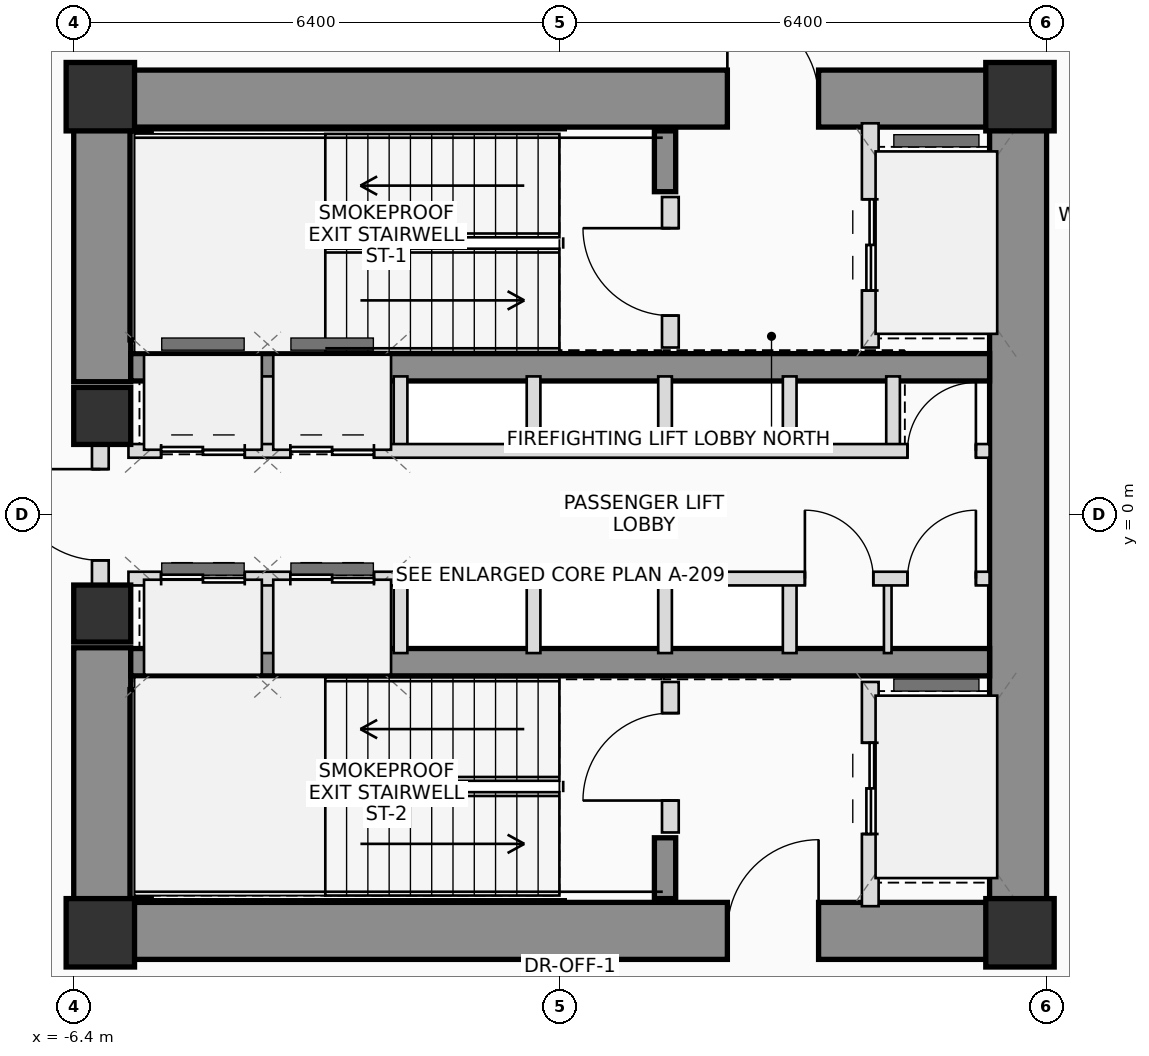
"""IFC4 building model, lengths in metres.
Left out: names, types, materials, properties, quantities, classifications, styles, units other than length and angle.
Written with IfcOpenShell. Run it as: python <this file> out.ifc"""

import sys

from ifc_helpers import new_model, si_unit, direction, frame, frame_2d, origin, origin_2d, place, context, subcontext, project, spatial, rectangle, extrude, source, transform, mapped, element, fill, save


model = new_model("IFC4")
c1 = context("Model", 3, precision=1e-05, world=origin(), true_north=direction((0.0, 1.0)))
c2 = subcontext(c1, "Body", "Model", "MODEL_VIEW")
j1 = project(units=[si_unit("LENGTHUNIT", "METRE"), si_unit("PLANEANGLEUNIT", "RADIAN")], contexts=[c1])
p1 = place(None, origin())
s1 = spatial("IfcSite", under=j1, at=p1, CompositionType="ELEMENT")
p2 = place(p1, origin())
s2 = spatial("IfcBuilding", under=s1, at=p2, CompositionType="ELEMENT")
p3 = place(p2, frame((0.0, 0.0, 89.9)))
s3 = spatial("IfcBuildingStorey", under=s2, at=p3, CompositionType="ELEMENT", Elevation=89.9)
m1 = source(origin(), c2, "Body", "SweptSolid", [
    extrude(rectangle(XDim=0.9, YDim=0.9, at=origin_2d()), origin(), (0.0, 0.0, 1.0), 3.75),
])
for number, where, z_axis, x_axis in (
    (1, (-6.05, -5.5, 0.0), (0.0, 0.0, 1.0), (1.0, 0.0, 0.0)),
    (2, (6.05, -5.5, 0.0), (0.0, 0.0, 1.0), (1.0, 0.0, 0.0)),
    (3, (6.05, 5.5, 0.0), (0.0, 0.0, 1.0), (1.0, 0.0, 0.0)),
    (4, (-6.05, 5.5, 0.0), (0.0, 0.0, 1.0), (1.0, 0.0, 0.0)),
):
    element("IfcColumn", number, at=place(p3, frame(where, z_axis=z_axis, x_axis=x_axis)), inside=s3, PredefinedType="COLUMN", context=c2, shape_type="MappedRepresentation", body=[
        mapped(m1, transform((0.0, 0.0, 0.0), scale=1.0)),
    ])
p4 = place(p3, frame((-6.4, 5.475, 0.0), z_axis=(0.0, 0.0, 1.0), x_axis=(1.0, 0.0, 0.0)))
e5 = element("IfcWall", 5, at=p4, inside=s3, PredefinedType="SHEAR", context=c2, shape_type="SweptSolid", body=[
    extrude(rectangle(XDim=12.8, YDim=0.75, at=frame_2d((6.4, 0.0))), origin(), (0.0, 0.0, 1.0), 3.75),
])
p5 = place(p4, frame((8.6, 0.0, 0.0)))
e6 = element("IfcOpeningElement", 6, at=p5, cuts=e5, PredefinedType="OPENING", context=c2, shape_type="SweptSolid", body=[
    extrude(rectangle(XDim=1.2, YDim=2.2, at=frame_2d((0.6, 1.1))), frame((0.0, 0.385, 0.0), z_axis=(0.0, -1.0, 0.0), x_axis=(1.0, 0.0, 0.0)), (0.0, 0.0, 1.0), 0.77),
])
p6 = place(p3, frame((-6.4, -5.475, 0.0), z_axis=(0.0, 0.0, 1.0), x_axis=(1.0, 0.0, 0.0)))
e7 = element("IfcWall", 7, at=p6, inside=s3, PredefinedType="SHEAR", context=c2, shape_type="SweptSolid", body=[
    extrude(rectangle(XDim=12.8, YDim=0.75, at=frame_2d((6.4, 0.0))), origin(), (0.0, 0.0, 1.0), 3.75),
])
p7 = place(p6, frame((8.6, 0.0, 0.0)))
e8 = element("IfcOpeningElement", 8, at=p7, cuts=e7, PredefinedType="OPENING", context=c2, shape_type="SweptSolid", body=[
    extrude(rectangle(XDim=1.2, YDim=2.2, at=frame_2d((0.6, 1.1))), frame((0.0, 0.385, 0.0), z_axis=(0.0, -1.0, 0.0), x_axis=(1.0, 0.0, 0.0)), (0.0, 0.0, 1.0), 0.77),
])
p8 = place(p3, frame((6.025, -5.1, 0.0), z_axis=(0.0, 0.0, 1.0), x_axis=(0.0, 1.0, 0.0)))
e9 = element("IfcWall", 9, at=p8, inside=s3, PredefinedType="SHEAR", context=c2, shape_type="SweptSolid", body=[
    extrude(rectangle(XDim=10.2, YDim=0.75, at=frame_2d((5.1, 0.0))), origin(), (0.0, 0.0, 1.0), 3.75),
])
for number, where, z_axis, x_axis in (
    (10, (-6.025, -5.1, 0.0), (0.0, 0.0, 1.0), (0.0, 1.0, 0.0)),
    (11, (-6.025, 1.75, 0.0), (0.0, 0.0, 1.0), (0.0, 1.0, 0.0)),
):
    element("IfcWall", number, at=place(p3, frame(where, z_axis=z_axis, x_axis=x_axis)), inside=s3, PredefinedType="SHEAR", context=c2, shape_type="SweptSolid", body=[
        extrude(rectangle(XDim=3.35, YDim=0.75, at=frame_2d((1.675, 0.0))), origin(), (0.0, 0.0, 1.0), 3.75),
    ])
for number, where, z_axis, x_axis in (
    (12, (-5.65, 1.94, 0.0), (0.0, 0.0, 1.0), (1.0, 0.0, 0.0)),
    (13, (-5.65, -1.94, 0.0), (0.0, 0.0, 1.0), (1.0, 0.0, 0.0)),
):
    element("IfcWall", number, at=place(p3, frame(where, z_axis=z_axis, x_axis=x_axis)), inside=s3, PredefinedType="SHEAR", context=c2, shape_type="SweptSolid", body=[
        extrude(rectangle(XDim=11.3, YDim=0.36, at=frame_2d((5.65, 0.0))), origin(), (0.0, 0.0, 1.0), 3.75),
    ])
p9 = place(p3, frame((-5.52, 2.3, 0.0), z_axis=(0.0, 0.0, 1.0), x_axis=(0.0, 1.0, 0.0)))
e14 = element("IfcWall", 14, at=p9, inside=s3, PredefinedType="SHEAR", context=c2, shape_type="SweptSolid", body=[
    extrude(rectangle(XDim=2.75, YDim=0.28, at=frame_2d((1.375, 0.0))), origin(), (0.0, 0.0, 1.0), 3.75),
])
p10 = place(p3, frame((1.38, 4.25, 0.0), z_axis=(0.0, 0.0, 1.0), x_axis=(0.0, 1.0, 0.0)))
e15 = element("IfcWall", 15, at=p10, inside=s3, PredefinedType="SHEAR", context=c2, shape_type="SweptSolid", body=[
    extrude(rectangle(XDim=0.8, YDim=0.28, at=frame_2d((0.4, 0.0))), origin(), (0.0, 0.0, 1.0), 3.75),
])
p11 = place(p3, frame((-5.52, -5.05, 0.0), z_axis=(0.0, 0.0, 1.0), x_axis=(0.0, 1.0, 0.0)))
e16 = element("IfcWall", 16, at=p11, inside=s3, PredefinedType="SHEAR", context=c2, shape_type="SweptSolid", body=[
    extrude(rectangle(XDim=2.75, YDim=0.28, at=frame_2d((1.375, 0.0))), origin(), (0.0, 0.0, 1.0), 3.75),
])
p12 = place(p3, frame((1.38, -5.05, 0.0), z_axis=(0.0, 0.0, 1.0), x_axis=(0.0, 1.0, 0.0)))
e17 = element("IfcWall", 17, at=p12, inside=s3, PredefinedType="SHEAR", context=c2, shape_type="SweptSolid", body=[
    extrude(rectangle(XDim=0.8, YDim=0.28, at=frame_2d((0.4, 0.0))), origin(), (0.0, 0.0, 1.0), 3.75),
])
m2 = source(origin(), c2, "Body", "SweptSolid", [
    extrude(rectangle(XDim=0.75, YDim=0.75, at=origin_2d()), origin(), (0.0, 0.0, 1.0), 3.75),
])
for number, where, z_axis, x_axis in (
    (18, (-6.025, -1.3, 0.0), (0.0, 0.0, 1.0), (1.0, 0.0, 0.0)),
    (19, (-6.025, 1.3, 0.0), (0.0, 0.0, 1.0), (1.0, 0.0, 0.0)),
):
    element("IfcColumn", number, at=place(p3, frame(where, z_axis=z_axis, x_axis=x_axis)), inside=s3, PredefinedType="COLUMN", context=c2, shape_type="MappedRepresentation", body=[
        mapped(m2, transform((0.0, 0.0, 0.0), scale=1.0)),
    ])
p13 = place(p3, frame((-6.05, -0.95, 0.0), z_axis=(0.0, 0.0, 1.0), x_axis=(0.0, 1.0, 0.0)))
e20 = element("IfcWall", 20, at=p13, inside=s3, PredefinedType="PLUMBINGWALL", context=c2, shape_type="SweptSolid", body=[
    extrude(rectangle(XDim=1.9, YDim=0.22, at=frame_2d((0.95, 0.0))), origin(), (0.0, 0.0, 1.0), 2.525),
])
p14 = place(p13, frame((0.35, 0.0, 0.0)))
e21 = element("IfcOpeningElement", 21, at=p14, cuts=e20, PredefinedType="OPENING", context=c2, shape_type="SweptSolid", body=[
    extrude(rectangle(XDim=1.2, YDim=2.2, at=frame_2d((0.6, 1.1))), frame((0.0, 0.12, 0.0), z_axis=(0.0, -1.0, 0.0), x_axis=(1.0, 0.0, 0.0)), (0.0, 0.0, 1.0), 0.24),
])
p15 = place(p3, frame((1.45, 2.2, 0.0), z_axis=(0.0, 0.0, 1.0), x_axis=(0.0, 1.0, 0.0)))
e22 = element("IfcWall", 22, at=p15, inside=s3, PredefinedType="PLUMBINGWALL", context=c2, shape_type="SweptSolid", body=[
    extrude(rectangle(XDim=1.98, YDim=0.22, at=frame_2d((0.99, 0.0))), origin(), (0.0, 0.0, 1.0), 3.545),
])
p16 = place(p15, frame((0.42, 0.0, 0.0)))
e23 = element("IfcOpeningElement", 23, at=p16, cuts=e22, PredefinedType="OPENING", context=c2, shape_type="SweptSolid", body=[
    extrude(rectangle(XDim=1.15, YDim=2.15, at=frame_2d((0.575, 1.075))), frame((0.0, 0.12, 0.0), z_axis=(0.0, -1.0, 0.0), x_axis=(1.0, 0.0, 0.0)), (0.0, 0.0, 1.0), 0.24),
])
p17 = place(p3, frame((4.08, 2.2, 0.0), z_axis=(0.0, 0.0, 1.0), x_axis=(0.0, 1.0, 0.0)))
e24 = element("IfcWall", 24, at=p17, inside=s3, PredefinedType="PLUMBINGWALL", context=c2, shape_type="SweptSolid", body=[
    extrude(rectangle(XDim=2.95, YDim=0.22, at=frame_2d((1.475, 0.0))), origin(), (0.0, 0.0, 1.0), 3.545),
])
p18 = place(p17, frame((0.75, 0.0, 0.0)))
e25 = element("IfcOpeningElement", 25, at=p18, cuts=e24, PredefinedType="OPENING", context=c2, shape_type="SweptSolid", body=[
    extrude(rectangle(XDim=1.2, YDim=2.25, at=frame_2d((0.6, 1.125))), frame((0.0, 0.12, 0.0), z_axis=(0.0, -1.0, 0.0), x_axis=(1.0, 0.0, 0.0)), (0.0, 0.0, 1.0), 0.24),
])
p19 = place(p3, frame((1.45, -4.18, 0.0), z_axis=(0.0, 0.0, 1.0), x_axis=(0.0, 1.0, 0.0)))
e26 = element("IfcWall", 26, at=p19, inside=s3, PredefinedType="PLUMBINGWALL", context=c2, shape_type="SweptSolid", body=[
    extrude(rectangle(XDim=1.98, YDim=0.22, at=frame_2d((0.99, 0.0))), origin(), (0.0, 0.0, 1.0), 3.545),
])
p20 = place(p19, frame((0.42, 0.0, 0.0)))
e27 = element("IfcOpeningElement", 27, at=p20, cuts=e26, PredefinedType="OPENING", context=c2, shape_type="SweptSolid", body=[
    extrude(rectangle(XDim=1.15, YDim=2.15, at=frame_2d((0.575, 1.075))), frame((0.0, 0.12, 0.0), z_axis=(0.0, -1.0, 0.0), x_axis=(1.0, 0.0, 0.0)), (0.0, 0.0, 1.0), 0.24),
])
p21 = place(p3, frame((4.08, -5.15, 0.0), z_axis=(0.0, 0.0, 1.0), x_axis=(0.0, 1.0, 0.0)))
e28 = element("IfcWall", 28, at=p21, inside=s3, PredefinedType="PLUMBINGWALL", context=c2, shape_type="SweptSolid", body=[
    extrude(rectangle(XDim=2.95, YDim=0.22, at=frame_2d((1.475, 0.0))), origin(), (0.0, 0.0, 1.0), 3.545),
])
p22 = place(p21, frame((0.95, 0.0, 0.0)))
e29 = element("IfcOpeningElement", 29, at=p22, cuts=e28, PredefinedType="OPENING", context=c2, shape_type="SweptSolid", body=[
    extrude(rectangle(XDim=1.2, YDim=2.25, at=frame_2d((0.6, 1.125))), frame((0.0, 0.12, 0.0), z_axis=(0.0, -1.0, 0.0), x_axis=(1.0, 0.0, 0.0)), (0.0, 0.0, 1.0), 0.24),
])
for number, where, z_axis, x_axis in (
    (30, (-3.85, 0.84, 0.0), (0.0, 0.0, 1.0), (0.0, 1.0, 0.0)),
    (31, (-3.85, -1.82, 0.0), (0.0, 0.0, 1.0), (0.0, 1.0, 0.0)),
    (32, (-2.1, 0.84, 0.0), (0.0, 0.0, 1.0), (0.0, 1.0, 0.0)),
    (33, (-2.1, -1.82, 0.0), (0.0, 0.0, 1.0), (0.0, 1.0, 0.0)),
    (34, (-0.35, 0.84, 0.0), (0.0, 0.0, 1.0), (0.0, 1.0, 0.0)),
    (35, (-0.35, -1.82, 0.0), (0.0, 0.0, 1.0), (0.0, 1.0, 0.0)),
    (36, (1.38, 0.84, 0.0), (0.0, 0.0, 1.0), (0.0, 1.0, 0.0)),
    (37, (1.38, -1.82, 0.0), (0.0, 0.0, 1.0), (0.0, 1.0, 0.0)),
    (38, (3.02, 0.84, 0.0), (0.0, 0.0, 1.0), (0.0, 1.0, 0.0)),
    (39, (4.38, 0.84, 0.0), (0.0, 0.0, 1.0), (0.0, 1.0, 0.0)),
    (40, (3.02, -1.82, 0.0), (0.0, 0.0, 1.0), (0.0, 1.0, 0.0)),
):
    element("IfcWall", number, at=place(p3, frame(where, z_axis=z_axis, x_axis=x_axis)), inside=s3, PredefinedType="PLUMBINGWALL", context=c2, shape_type="SweptSolid", body=[
        extrude(rectangle(XDim=0.98, YDim=0.18, at=frame_2d((0.49, 0.0))), origin(), (0.0, 0.0, 1.0), 3.545),
    ])
p23 = place(p3, frame((4.31, -1.82, 0.0), z_axis=(0.0, 0.0, 1.0), x_axis=(0.0, 1.0, 0.0)))
e41 = element("IfcWall", 41, at=p23, inside=s3, PredefinedType="PARTITIONING", context=c2, shape_type="SweptSolid", body=[
    extrude(rectangle(XDim=0.98, YDim=0.1, at=frame_2d((0.49, 0.0))), origin(), (0.0, 0.0, 1.0), 3.545),
])
p24 = place(p3, frame((-5.68, 0.84, 0.0), z_axis=(0.0, 0.0, 1.0), x_axis=(1.0, 0.0, 0.0)))
e42 = element("IfcWall", 42, at=p24, inside=s3, PredefinedType="PLUMBINGWALL", context=c2, shape_type="SweptSolid", body=[
    extrude(rectangle(XDim=11.33, YDim=0.18, at=frame_2d((5.665, 0.0))), origin(), (0.0, 0.0, 1.0), 3.545),
])
p25 = place(p24, frame((0.43, 0.0, 0.0)))
e43 = element("IfcOpeningElement", 43, at=p25, cuts=e42, PredefinedType="OPENING", context=c2, shape_type="SweptSolid", body=[
    extrude(rectangle(XDim=1.1, YDim=2.2, at=frame_2d((0.55, 1.1))), frame((0.0, 0.1, 0.0), z_axis=(0.0, -1.0, 0.0), x_axis=(1.0, 0.0, 0.0)), (0.0, 0.0, 1.0), 0.2),
])
p26 = place(p24, frame((2.13, 0.0, 0.0)))
e44 = element("IfcOpeningElement", 44, at=p26, cuts=e42, PredefinedType="OPENING", context=c2, shape_type="SweptSolid", body=[
    extrude(rectangle(XDim=1.1, YDim=2.2, at=frame_2d((0.55, 1.1))), frame((0.0, 0.1, 0.0), z_axis=(0.0, -1.0, 0.0), x_axis=(1.0, 0.0, 0.0)), (0.0, 0.0, 1.0), 0.2),
])
p27 = place(p24, frame((10.25, 0.0, 0.0)))
e45 = element("IfcOpeningElement", 45, at=p27, cuts=e42, PredefinedType="OPENING", context=c2, shape_type="SweptSolid", body=[
    extrude(rectangle(XDim=0.9, YDim=2.05, at=frame_2d((0.45, 1.025))), frame((0.0, 0.1, 0.0), z_axis=(0.0, -1.0, 0.0), x_axis=(1.0, 0.0, 0.0)), (0.0, 0.0, 1.0), 0.2),
])
p28 = place(p3, frame((-5.68, -0.84, 0.0), z_axis=(0.0, 0.0, 1.0), x_axis=(1.0, 0.0, 0.0)))
e46 = element("IfcWall", 46, at=p28, inside=s3, PredefinedType="PLUMBINGWALL", context=c2, shape_type="SweptSolid", body=[
    extrude(rectangle(XDim=11.33, YDim=0.18, at=frame_2d((5.665, 0.0))), origin(), (0.0, 0.0, 1.0), 3.545),
])
p29 = place(p28, frame((0.43, 0.0, 0.0)))
e47 = element("IfcOpeningElement", 47, at=p29, cuts=e46, PredefinedType="OPENING", context=c2, shape_type="SweptSolid", body=[
    extrude(rectangle(XDim=1.1, YDim=2.2, at=frame_2d((0.55, 1.1))), frame((0.0, 0.1, 0.0), z_axis=(0.0, -1.0, 0.0), x_axis=(1.0, 0.0, 0.0)), (0.0, 0.0, 1.0), 0.2),
])
p30 = place(p28, frame((2.13, 0.0, 0.0)))
e48 = element("IfcOpeningElement", 48, at=p30, cuts=e46, PredefinedType="OPENING", context=c2, shape_type="SweptSolid", body=[
    extrude(rectangle(XDim=1.1, YDim=2.2, at=frame_2d((0.55, 1.1))), frame((0.0, 0.1, 0.0), z_axis=(0.0, -1.0, 0.0), x_axis=(1.0, 0.0, 0.0)), (0.0, 0.0, 1.0), 0.2),
])
p31 = place(p28, frame((8.9, 0.0, 0.0)))
e49 = element("IfcOpeningElement", 49, at=p31, cuts=e46, PredefinedType="OPENING", context=c2, shape_type="SweptSolid", body=[
    extrude(rectangle(XDim=0.9, YDim=2.05, at=frame_2d((0.45, 1.025))), frame((0.0, 0.1, 0.0), z_axis=(0.0, -1.0, 0.0), x_axis=(1.0, 0.0, 0.0)), (0.0, 0.0, 1.0), 0.2),
])
p32 = place(p28, frame((10.25, 0.0, 0.0)))
e50 = element("IfcOpeningElement", 50, at=p32, cuts=e46, PredefinedType="OPENING", context=c2, shape_type="SweptSolid", body=[
    extrude(rectangle(XDim=0.9, YDim=2.05, at=frame_2d((0.45, 1.025))), frame((0.0, 0.1, 0.0), z_axis=(0.0, -1.0, 0.0), x_axis=(1.0, 0.0, 0.0)), (0.0, 0.0, 1.0), 0.2),
])
p33 = place(p5, origin())
e51 = element("IfcDoor", 51, at=p33, inside=s3, OperationType="SINGLE_SWING_LEFT", PredefinedType="DOOR", context=c2, shape_type="SweptSolid", body=[
    extrude(rectangle(XDim=1.2, YDim=2.2, at=frame_2d((0.6, 1.1))), frame((0.0, 0.025, 0.0), z_axis=(0.0, -1.0, 0.0), x_axis=(1.0, 0.0, 0.0)), (0.0, 0.0, 1.0), 0.05),
])
fill(e6, e51)
p34 = place(p7, origin())
e52 = element("IfcDoor", 52, at=p34, inside=s3, OperationType="SINGLE_SWING_RIGHT", PredefinedType="DOOR", context=c2, shape_type="SweptSolid", body=[
    extrude(rectangle(XDim=1.2, YDim=2.2, at=frame_2d((0.6, 1.1))), frame((0.0, 0.025, 0.0), z_axis=(0.0, -1.0, 0.0), x_axis=(1.0, 0.0, 0.0)), (0.0, 0.0, 1.0), 0.05),
])
fill(e8, e52)
p35 = place(p14, origin())
e53 = element("IfcDoor", 53, at=p35, inside=s3, OperationType="SINGLE_SWING_RIGHT", PredefinedType="DOOR", context=c2, shape_type="SweptSolid", body=[
    extrude(rectangle(XDim=1.2, YDim=2.2, at=frame_2d((0.6, 1.1))), frame((0.0, 0.025, 0.0), z_axis=(0.0, -1.0, 0.0), x_axis=(1.0, 0.0, 0.0)), (0.0, 0.0, 1.0), 0.05),
])
fill(e21, e53)
p36 = place(p16, origin())
e54 = element("IfcDoor", 54, at=p36, inside=s3, OperationType="SINGLE_SWING_RIGHT", PredefinedType="DOOR", context=c2, shape_type="SweptSolid", body=[
    extrude(rectangle(XDim=1.15, YDim=2.15, at=frame_2d((0.575, 1.075))), frame((0.0, 0.025, 0.0), z_axis=(0.0, -1.0, 0.0), x_axis=(1.0, 0.0, 0.0)), (0.0, 0.0, 1.0), 0.05),
])
fill(e23, e54)
p37 = place(p18, origin())
e55 = element("IfcDoor", 55, at=p37, inside=s3, OperationType="DOUBLE_DOOR_SLIDING", PredefinedType="DOOR", context=c2, shape_type="SweptSolid", body=[
    extrude(rectangle(XDim=1.2, YDim=2.25, at=frame_2d((0.6, 1.125))), frame((0.0, 0.025, 0.0), z_axis=(0.0, -1.0, 0.0), x_axis=(1.0, 0.0, 0.0)), (0.0, 0.0, 1.0), 0.05),
])
fill(e25, e55)
p38 = place(p20, origin())
e56 = element("IfcDoor", 56, at=p38, inside=s3, OperationType="SINGLE_SWING_LEFT", PredefinedType="DOOR", context=c2, shape_type="SweptSolid", body=[
    extrude(rectangle(XDim=1.15, YDim=2.15, at=frame_2d((0.575, 1.075))), frame((0.0, 0.025, 0.0), z_axis=(0.0, -1.0, 0.0), x_axis=(1.0, 0.0, 0.0)), (0.0, 0.0, 1.0), 0.05),
])
fill(e27, e56)
p39 = place(p22, origin())
e57 = element("IfcDoor", 57, at=p39, inside=s3, OperationType="DOUBLE_DOOR_SLIDING", PredefinedType="DOOR", context=c2, shape_type="SweptSolid", body=[
    extrude(rectangle(XDim=1.2, YDim=2.25, at=frame_2d((0.6, 1.125))), frame((0.0, 0.025, 0.0), z_axis=(0.0, -1.0, 0.0), x_axis=(1.0, 0.0, 0.0)), (0.0, 0.0, 1.0), 0.05),
])
fill(e29, e57)
p40 = place(p25, origin())
e58 = element("IfcDoor", 58, at=p40, inside=s3, OperationType="DOUBLE_DOOR_SLIDING", PredefinedType="DOOR", context=c2, shape_type="SweptSolid", body=[
    extrude(rectangle(XDim=1.1, YDim=2.2, at=frame_2d((0.55, 1.1))), frame((0.0, 0.025, 0.0), z_axis=(0.0, -1.0, 0.0), x_axis=(1.0, 0.0, 0.0)), (0.0, 0.0, 1.0), 0.05),
])
fill(e43, e58)
p41 = place(p26, origin())
e59 = element("IfcDoor", 59, at=p41, inside=s3, OperationType="DOUBLE_DOOR_SLIDING", PredefinedType="DOOR", context=c2, shape_type="SweptSolid", body=[
    extrude(rectangle(XDim=1.1, YDim=2.2, at=frame_2d((0.55, 1.1))), frame((0.0, 0.025, 0.0), z_axis=(0.0, -1.0, 0.0), x_axis=(1.0, 0.0, 0.0)), (0.0, 0.0, 1.0), 0.05),
])
fill(e44, e59)
p42 = place(p27, origin())
e60 = element("IfcDoor", 60, at=p42, inside=s3, OperationType="SINGLE_SWING_RIGHT", PredefinedType="DOOR", context=c2, shape_type="SweptSolid", body=[
    extrude(rectangle(XDim=0.9, YDim=2.05, at=frame_2d((0.45, 1.025))), frame((0.0, 0.025, 0.0), z_axis=(0.0, -1.0, 0.0), x_axis=(1.0, 0.0, 0.0)), (0.0, 0.0, 1.0), 0.05),
])
fill(e45, e60)
p43 = place(p29, origin())
e61 = element("IfcDoor", 61, at=p43, inside=s3, OperationType="DOUBLE_DOOR_SLIDING", PredefinedType="DOOR", context=c2, shape_type="SweptSolid", body=[
    extrude(rectangle(XDim=1.1, YDim=2.2, at=frame_2d((0.55, 1.1))), frame((0.0, 0.025, 0.0), z_axis=(0.0, -1.0, 0.0), x_axis=(1.0, 0.0, 0.0)), (0.0, 0.0, 1.0), 0.05),
])
fill(e47, e61)
p44 = place(p30, origin())
e62 = element("IfcDoor", 62, at=p44, inside=s3, OperationType="DOUBLE_DOOR_SLIDING", PredefinedType="DOOR", context=c2, shape_type="SweptSolid", body=[
    extrude(rectangle(XDim=1.1, YDim=2.2, at=frame_2d((0.55, 1.1))), frame((0.0, 0.025, 0.0), z_axis=(0.0, -1.0, 0.0), x_axis=(1.0, 0.0, 0.0)), (0.0, 0.0, 1.0), 0.05),
])
fill(e48, e62)
p45 = place(p31, origin())
e63 = element("IfcDoor", 63, at=p45, inside=s3, OperationType="SINGLE_SWING_LEFT", PredefinedType="DOOR", context=c2, shape_type="SweptSolid", body=[
    extrude(rectangle(XDim=0.9, YDim=2.05, at=frame_2d((0.45, 1.025))), frame((0.0, 0.025, 0.0), z_axis=(0.0, -1.0, 0.0), x_axis=(1.0, 0.0, 0.0)), (0.0, 0.0, 1.0), 0.05),
])
fill(e49, e63)
p46 = place(p32, origin())
e64 = element("IfcDoor", 64, at=p46, inside=s3, OperationType="SINGLE_SWING_RIGHT", PredefinedType="DOOR", context=c2, shape_type="SweptSolid", body=[
    extrude(rectangle(XDim=0.9, YDim=2.05, at=frame_2d((0.45, 1.025))), frame((0.0, 0.025, 0.0), z_axis=(0.0, -1.0, 0.0), x_axis=(1.0, 0.0, 0.0)), (0.0, 0.0, 1.0), 0.05),
])
fill(e50, e64)
save(model, sys.argv[1])
